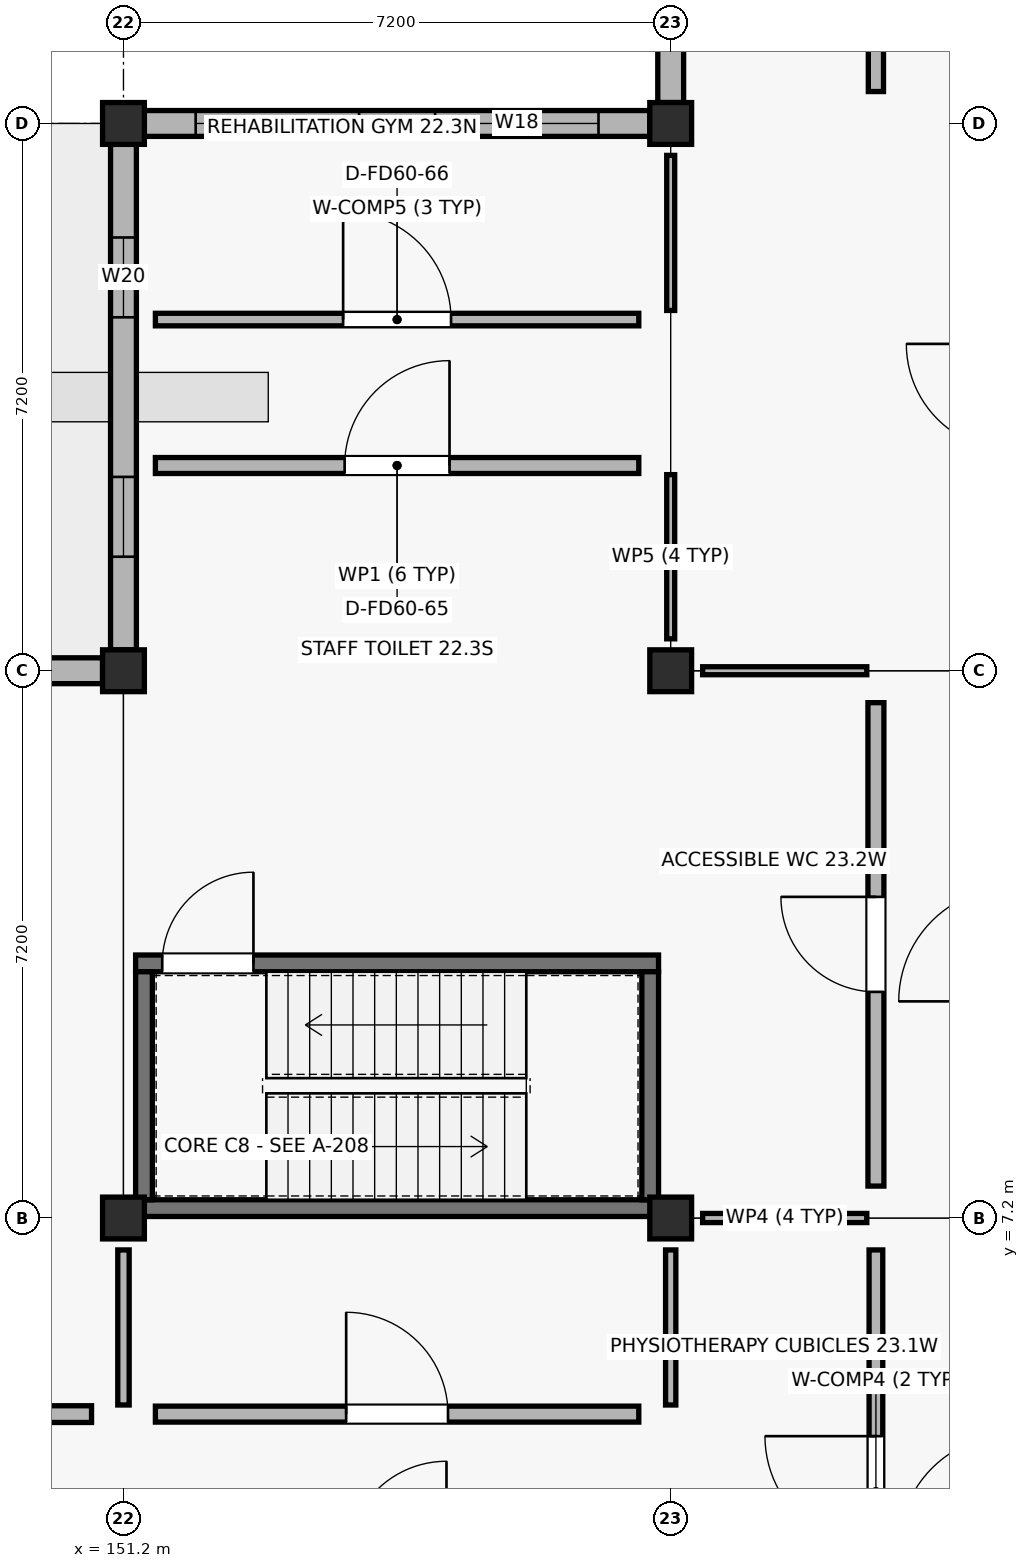
"""IFC4 building model, lengths in metres.
Left out: names, types, materials, properties, quantities, classifications, styles, units other than length and angle.
Written with IfcOpenShell. Run it as: python <this file> out.ifc"""

import sys

from ifc_helpers import new_model, si_unit, direction, frame, frame_2d, origin, origin_2d, place, context, subcontext, project, spatial, rectangle, extrude, element, fill, save


model = new_model("IFC4")
c1 = context("Model", 3, precision=1e-05, world=origin(), true_north=direction((0.0, 1.0)))
c2 = subcontext(c1, "Body", "Model", "MODEL_VIEW")
j1 = project(units=[si_unit("LENGTHUNIT", "METRE"), si_unit("PLANEANGLEUNIT", "RADIAN")], contexts=[c1])
p1 = place(None, origin())
s1 = spatial("IfcSite", under=j1, at=p1, CompositionType="ELEMENT")
p2 = place(p1, origin())
s2 = spatial("IfcBuilding", under=s1, at=p2, CompositionType="ELEMENT")
p3 = place(p2, origin())
s3 = spatial("IfcBuildingStorey", under=s2, at=p3, CompositionType="ELEMENT", Elevation=0.0)
for number, where, z_axis, x_axis in (
    (1, (151.2, 7.2, -0.25), (0.0, 0.0, 1.0), (1.0, 0.0, 0.0)),
    (2, (151.2, 14.4, -0.25), (0.0, 0.0, 1.0), (1.0, 0.0, 0.0)),
    (3, (151.2, 21.6, -0.25), (0.0, 0.0, 1.0), (1.0, 0.0, 0.0)),
    (4, (158.4, 7.2, -0.25), (0.0, 0.0, 1.0), (1.0, 0.0, 0.0)),
    (5, (158.4, 14.4, -0.25), (0.0, 0.0, 1.0), (1.0, 0.0, 0.0)),
    (6, (158.4, 21.6, -0.25), (0.0, 0.0, 1.0), (1.0, 0.0, 0.0)),
):
    element("IfcColumn", number, at=place(p3, frame(where, z_axis=z_axis, x_axis=x_axis)), inside=s3, PredefinedType="COLUMN", context=c2, shape_type="SweptSolid", body=[
        extrude(rectangle(XDim=0.55, YDim=0.55, at=origin_2d()), origin(), (0.0, 0.0, 1.0), 4.75),
    ])
p4 = place(p3, frame((150.925, 14.4, 0.0), z_axis=(0.0, 0.0, 1.0), x_axis=(-1.0, 0.0, 0.0)))
e7 = element("IfcWall", 7, at=p4, inside=s3, PredefinedType="SOLIDWALL", context=c2, shape_type="SweptSolid", body=[
    extrude(rectangle(XDim=6.65, YDim=0.34, at=frame_2d((3.325, 0.0))), origin(), (0.0, 0.0, 1.0), 3.47),
])
p5 = place(p4, frame((1.075, 0.0, 0.9)))
e8 = element("IfcOpeningElement", 8, at=p5, cuts=e7, PredefinedType="OPENING", context=c2, shape_type="SweptSolid", body=[
    extrude(rectangle(XDim=1.35, YDim=1.25, at=frame_2d((0.675, 0.625))), frame((0.0, 0.18, 0.0), z_axis=(0.0, -1.0, 0.0), x_axis=(1.0, 0.0, 0.0)), (0.0, 0.0, 1.0), 0.36),
])
p6 = place(p4, frame((4.225, 0.0, 0.9)))
e9 = element("IfcOpeningElement", 9, at=p6, cuts=e7, PredefinedType="OPENING", context=c2, shape_type="SweptSolid", body=[
    extrude(rectangle(XDim=1.35, YDim=1.25, at=frame_2d((0.675, 0.625))), frame((0.0, 0.18, 0.0), z_axis=(0.0, -1.0, 0.0), x_axis=(1.0, 0.0, 0.0)), (0.0, 0.0, 1.0), 0.36),
])
p7 = place(p3, frame((158.125, 21.6, 0.0), z_axis=(0.0, 0.0, 1.0), x_axis=(-1.0, 0.0, 0.0)))
e10 = element("IfcWall", 10, at=p7, inside=s3, PredefinedType="SOLIDWALL", context=c2, shape_type="SweptSolid", body=[
    extrude(rectangle(XDim=6.65, YDim=0.34, at=frame_2d((3.325, 0.0))), origin(), (0.0, 0.0, 1.0), 3.47),
])
p8 = place(p7, frame((0.675, 0.0, 0.9)))
e11 = element("IfcOpeningElement", 11, at=p8, cuts=e10, PredefinedType="OPENING", context=c2, shape_type="SweptSolid", body=[
    extrude(rectangle(XDim=2.15, YDim=1.38, at=frame_2d((1.075, 0.69))), frame((0.0, 0.18, 0.0), z_axis=(0.0, -1.0, 0.0), x_axis=(1.0, 0.0, 0.0)), (0.0, 0.0, 1.0), 0.36),
])
p9 = place(p7, frame((3.825, 0.0, 0.9)))
e12 = element("IfcOpeningElement", 12, at=p9, cuts=e10, PredefinedType="OPENING", context=c2, shape_type="SweptSolid", body=[
    extrude(rectangle(XDim=2.15, YDim=1.38, at=frame_2d((1.075, 0.69))), frame((0.0, 0.18, 0.0), z_axis=(0.0, -1.0, 0.0), x_axis=(1.0, 0.0, 0.0)), (0.0, 0.0, 1.0), 0.36),
])
p10 = place(p3, frame((151.2, 21.325, 0.0), z_axis=(0.0, 0.0, 1.0), x_axis=(0.0, -1.0, 0.0)))
e13 = element("IfcWall", 13, at=p10, inside=s3, PredefinedType="SOLIDWALL", context=c2, shape_type="SweptSolid", body=[
    extrude(rectangle(XDim=6.65, YDim=0.34, at=frame_2d((3.325, 0.0))), origin(), (0.0, 0.0, 1.0), 3.52),
])
p11 = place(p10, frame((1.225, 0.0, 0.9)))
e14 = element("IfcOpeningElement", 14, at=p11, cuts=e13, PredefinedType="OPENING", context=c2, shape_type="SweptSolid", body=[
    extrude(rectangle(XDim=1.05, YDim=1.5, at=frame_2d((0.525, 0.75))), frame((0.0, 0.18, 0.0), z_axis=(0.0, -1.0, 0.0), x_axis=(1.0, 0.0, 0.0)), (0.0, 0.0, 1.0), 0.36),
])
p12 = place(p10, frame((4.375, 0.0, 0.9)))
e15 = element("IfcOpeningElement", 15, at=p12, cuts=e13, PredefinedType="OPENING", context=c2, shape_type="SweptSolid", body=[
    extrude(rectangle(XDim=1.05, YDim=1.5, at=frame_2d((0.525, 0.75))), frame((0.0, 0.18, 0.0), z_axis=(0.0, -1.0, 0.0), x_axis=(1.0, 0.0, 0.0)), (0.0, 0.0, 1.0), 0.36),
])
p13 = place(p3, frame((158.4, 28.525, 0.0), z_axis=(0.0, 0.0, 1.0), x_axis=(0.0, -1.0, 0.0)))
e16 = element("IfcWall", 16, at=p13, inside=s3, PredefinedType="SOLIDWALL", context=c2, shape_type="SweptSolid", body=[
    extrude(rectangle(XDim=6.65, YDim=0.34, at=frame_2d((3.325, 0.0))), origin(), (0.0, 0.0, 1.0), 3.52),
])
p14 = place(p13, frame((0.925, 0.0, 0.9)))
e17 = element("IfcOpeningElement", 17, at=p14, cuts=e16, PredefinedType="OPENING", context=c2, shape_type="SweptSolid", body=[
    extrude(rectangle(XDim=1.65, YDim=1.75, at=frame_2d((0.825, 0.875))), frame((0.0, 0.18, 0.0), z_axis=(0.0, -1.0, 0.0), x_axis=(1.0, 0.0, 0.0)), (0.0, 0.0, 1.0), 0.36),
])
p15 = place(p13, frame((4.075, 0.0, 0.9)))
e18 = element("IfcOpeningElement", 18, at=p15, cuts=e16, PredefinedType="OPENING", context=c2, shape_type="SweptSolid", body=[
    extrude(rectangle(XDim=1.65, YDim=1.75, at=frame_2d((0.825, 0.875))), frame((0.0, 0.18, 0.0), z_axis=(0.0, -1.0, 0.0), x_axis=(1.0, 0.0, 0.0)), (0.0, 0.0, 1.0), 0.36),
])
p16 = place(p3, frame((151.36, 7.33, -0.25), z_axis=(0.0, 0.0, 1.0), x_axis=(1.0, 0.0, 0.0)))
e19 = element("IfcWall", 19, at=p16, inside=s3, PredefinedType="SHEAR", context=c2, shape_type="SweptSolid", body=[
    extrude(rectangle(XDim=6.88, YDim=0.22, at=frame_2d((3.44, 0.0))), origin(), (0.0, 0.0, 1.0), 4.47),
])
p17 = place(p3, frame((151.36, 10.55, -0.25), z_axis=(0.0, 0.0, 1.0), x_axis=(1.0, 0.0, 0.0)))
e20 = element("IfcWall", 20, at=p17, inside=s3, PredefinedType="SHEAR", context=c2, shape_type="SweptSolid", body=[
    extrude(rectangle(XDim=6.88, YDim=0.22, at=frame_2d((3.44, 0.0))), origin(), (0.0, 0.0, 1.0), 4.47),
])
p18 = place(p17, frame((0.35, 0.0, 0.25)))
e21 = element("IfcOpeningElement", 21, at=p18, cuts=e20, PredefinedType="OPENING", context=c2, shape_type="SweptSolid", body=[
    extrude(rectangle(XDim=1.2, YDim=2.15, at=frame_2d((0.6, 1.075))), frame((0.0, 0.12, 0.0), z_axis=(0.0, -1.0, 0.0), x_axis=(1.0, 0.0, 0.0)), (0.0, 0.0, 1.0), 0.24),
])
for number, where, z_axis, x_axis in (
    (22, (151.47, 7.44, -0.25), (0.0, 0.0, 1.0), (0.0, 1.0, 0.0)),
    (23, (158.13, 7.44, -0.25), (0.0, 0.0, 1.0), (0.0, 1.0, 0.0)),
):
    element("IfcWall", number, at=place(p3, frame(where, z_axis=z_axis, x_axis=x_axis)), inside=s3, PredefinedType="SHEAR", context=c2, shape_type="SweptSolid", body=[
        extrude(rectangle(XDim=3.0, YDim=0.22, at=frame_2d((1.5, 0.0))), origin(), (0.0, 0.0, 1.0), 4.47),
    ])
p19 = place(p3, frame((144.42, 4.62, 0.0), z_axis=(0.0, 0.0, 1.0), x_axis=(1.0, 0.0, 0.0)))
e24 = element("IfcWall", 24, at=p19, inside=s3, PredefinedType="SOLIDWALL", context=c2, shape_type="SweptSolid", body=[
    extrude(rectangle(XDim=6.36, YDim=0.22, at=frame_2d((3.18, 0.0))), origin(), (0.0, 0.0, 1.0), 3.36),
])
p20 = place(p19, frame((2.55, 0.0, 0.0)))
e25 = element("IfcOpeningElement", 25, at=p20, cuts=e24, PredefinedType="OPENING", context=c2, shape_type="SweptSolid", body=[
    extrude(rectangle(XDim=1.26, YDim=2.19, at=frame_2d((0.63, 1.095))), frame((0.0, 0.12, 0.0), z_axis=(0.0, -1.0, 0.0), x_axis=(1.0, 0.0, 0.0)), (0.0, 0.0, 1.0), 0.24),
])
p21 = place(p3, frame((151.2, 4.74, 0.0), z_axis=(0.0, 0.0, 1.0), x_axis=(0.0, 1.0, 0.0)))
e26 = element("IfcWall", 26, at=p21, inside=s3, PredefinedType="PARTITIONING", context=c2, shape_type="SweptSolid", body=[
    extrude(rectangle(XDim=2.04, YDim=0.15, at=frame_2d((1.02, 0.0))), origin(), (0.0, 0.0, 1.0), 3.36),
])
p22 = place(p3, frame((151.62, 4.62, 0.0), z_axis=(0.0, 0.0, 1.0), x_axis=(1.0, 0.0, 0.0)))
e27 = element("IfcWall", 27, at=p22, inside=s3, PredefinedType="PLUMBINGWALL", context=c2, shape_type="SweptSolid", body=[
    extrude(rectangle(XDim=6.36, YDim=0.21, at=frame_2d((3.18, 0.0))), origin(), (0.0, 0.0, 1.0), 3.36),
])
p23 = place(p22, frame((2.51, 0.0, 0.0)))
e28 = element("IfcOpeningElement", 28, at=p23, cuts=e27, PredefinedType="OPENING", context=c2, shape_type="SweptSolid", body=[
    extrude(rectangle(XDim=1.34, YDim=2.19, at=frame_2d((0.67, 1.095))), frame((0.0, 0.115, 0.0), z_axis=(0.0, -1.0, 0.0), x_axis=(1.0, 0.0, 0.0)), (0.0, 0.0, 1.0), 0.23),
])
p24 = place(p3, frame((158.4, 4.74, 0.0), z_axis=(0.0, 0.0, 1.0), x_axis=(0.0, 1.0, 0.0)))
e29 = element("IfcWall", 29, at=p24, inside=s3, PredefinedType="PARTITIONING", context=c2, shape_type="SweptSolid", body=[
    extrude(rectangle(XDim=2.04, YDim=0.135, at=frame_2d((1.02, 0.0))), origin(), (0.0, 0.0, 1.0), 3.36),
])
p25 = place(p3, frame((151.62, 17.1, 0.0), z_axis=(0.0, 0.0, 1.0), x_axis=(1.0, 0.0, 0.0)))
e30 = element("IfcWall", 30, at=p25, inside=s3, PredefinedType="PLUMBINGWALL", context=c2, shape_type="SweptSolid", body=[
    extrude(rectangle(XDim=6.36, YDim=0.21, at=frame_2d((3.18, 0.0))), origin(), (0.0, 0.0, 1.0), 3.36),
])
p26 = place(p25, frame((2.49, 0.0, 0.0)))
e31 = element("IfcOpeningElement", 31, at=p26, cuts=e30, PredefinedType="OPENING", context=c2, shape_type="SweptSolid", body=[
    extrude(rectangle(XDim=1.38, YDim=2.19, at=frame_2d((0.69, 1.095))), frame((0.0, 0.115, 0.0), z_axis=(0.0, -1.0, 0.0), x_axis=(1.0, 0.0, 0.0)), (0.0, 0.0, 1.0), 0.23),
])
p27 = place(p3, frame((158.4, 14.82, 0.0), z_axis=(0.0, 0.0, 1.0), x_axis=(0.0, 1.0, 0.0)))
e32 = element("IfcWall", 32, at=p27, inside=s3, PredefinedType="PARTITIONING", context=c2, shape_type="SweptSolid", body=[
    extrude(rectangle(XDim=2.16, YDim=0.105, at=frame_2d((1.08, 0.0))), origin(), (0.0, 0.0, 1.0), 3.36),
])
p28 = place(p3, frame((151.62, 19.02, 0.0), z_axis=(0.0, 0.0, 1.0), x_axis=(1.0, 0.0, 0.0)))
e33 = element("IfcWall", 33, at=p28, inside=s3, PredefinedType="PARTITIONING", context=c2, shape_type="SweptSolid", body=[
    extrude(rectangle(XDim=6.36, YDim=0.165, at=frame_2d((3.18, 0.0))), origin(), (0.0, 0.0, 1.0), 3.36),
])
p29 = place(p28, frame((2.47, 0.0, 0.0)))
e34 = element("IfcOpeningElement", 34, at=p29, cuts=e33, PredefinedType="OPENING", context=c2, shape_type="SweptSolid", body=[
    extrude(rectangle(XDim=1.42, YDim=2.19, at=frame_2d((0.71, 1.095))), frame((0.0, 0.093, 0.0), z_axis=(0.0, -1.0, 0.0), x_axis=(1.0, 0.0, 0.0)), (0.0, 0.0, 1.0), 0.185),
])
p30 = place(p3, frame((158.4, 19.14, 0.0), z_axis=(0.0, 0.0, 1.0), x_axis=(0.0, 1.0, 0.0)))
e35 = element("IfcWall", 35, at=p30, inside=s3, PredefinedType="PARTITIONING", context=c2, shape_type="SweptSolid", body=[
    extrude(rectangle(XDim=2.04, YDim=0.105, at=frame_2d((1.02, 0.0))), origin(), (0.0, 0.0, 1.0), 3.36),
])
p31 = place(p3, frame((161.1, 0.42, 0.0), z_axis=(0.0, 0.0, 1.0), x_axis=(0.0, 1.0, 0.0)))
e36 = element("IfcWall", 36, at=p31, inside=s3, PredefinedType="PARTITIONING", context=c2, shape_type="SweptSolid", body=[
    extrude(rectangle(XDim=6.36, YDim=0.18, at=frame_2d((3.18, 0.0))), origin(), (0.0, 0.0, 1.0), 3.36),
])
p32 = place(p31, frame((2.45, 0.0, 0.0)))
e37 = element("IfcOpeningElement", 37, at=p32, cuts=e36, PredefinedType="OPENING", context=c2, shape_type="SweptSolid", body=[
    extrude(rectangle(XDim=1.46, YDim=2.19, at=frame_2d((0.73, 1.095))), frame((0.0, 0.1, 0.0), z_axis=(0.0, -1.0, 0.0), x_axis=(1.0, 0.0, 0.0)), (0.0, 0.0, 1.0), 0.2),
])
p33 = place(p3, frame((158.82, 7.2, 0.0), z_axis=(0.0, 0.0, 1.0), x_axis=(1.0, 0.0, 0.0)))
e38 = element("IfcWall", 38, at=p33, inside=s3, PredefinedType="PARTITIONING", context=c2, shape_type="SweptSolid", body=[
    extrude(rectangle(XDim=2.16, YDim=0.12, at=frame_2d((1.08, 0.0))), origin(), (0.0, 0.0, 1.0), 3.36),
])
p34 = place(p3, frame((161.1, 7.62, 0.0), z_axis=(0.0, 0.0, 1.0), x_axis=(0.0, 1.0, 0.0)))
e39 = element("IfcWall", 39, at=p34, inside=s3, PredefinedType="PLUMBINGWALL", context=c2, shape_type="SweptSolid", body=[
    extrude(rectangle(XDim=6.36, YDim=0.21, at=frame_2d((3.18, 0.0))), origin(), (0.0, 0.0, 1.0), 3.36),
])
p35 = place(p34, frame((2.555, 0.0, 0.0)))
e40 = element("IfcOpeningElement", 40, at=p35, cuts=e39, PredefinedType="OPENING", context=c2, shape_type="SweptSolid", body=[
    extrude(rectangle(XDim=1.25, YDim=2.15, at=frame_2d((0.625, 1.075))), frame((0.0, 0.115, 0.0), z_axis=(0.0, -1.0, 0.0), x_axis=(1.0, 0.0, 0.0)), (0.0, 0.0, 1.0), 0.23),
])
p36 = place(p3, frame((158.82, 14.4, 0.0), z_axis=(0.0, 0.0, 1.0), x_axis=(1.0, 0.0, 0.0)))
e41 = element("IfcWall", 41, at=p36, inside=s3, PredefinedType="PARTITIONING", context=c2, shape_type="SweptSolid", body=[
    extrude(rectangle(XDim=2.16, YDim=0.105, at=frame_2d((1.08, 0.0))), origin(), (0.0, 0.0, 1.0), 3.36),
])
p37 = place(p3, frame((161.1, 22.02, 0.0), z_axis=(0.0, 0.0, 1.0), x_axis=(0.0, 1.0, 0.0)))
e42 = element("IfcWall", 42, at=p37, inside=s3, PredefinedType="SOLIDWALL", context=c2, shape_type="SweptSolid", body=[
    extrude(rectangle(XDim=6.36, YDim=0.2, at=frame_2d((3.18, 0.0))), origin(), (0.0, 0.0, 1.0), 3.36),
])
p38 = place(p37, frame((2.505, 0.0, 0.0)))
e43 = element("IfcOpeningElement", 43, at=p38, cuts=e42, PredefinedType="OPENING", context=c2, shape_type="SweptSolid", body=[
    extrude(rectangle(XDim=1.35, YDim=2.2, at=frame_2d((0.675, 1.1))), frame((0.0, 0.11, 0.0), z_axis=(0.0, -1.0, 0.0), x_axis=(1.0, 0.0, 0.0)), (0.0, 0.0, 1.0), 0.22),
])
p39 = place(p8, origin())
e44 = element("IfcWindow", 44, at=p39, inside=s3, PartitioningType="SINGLE_PANEL", PredefinedType="WINDOW", context=c2, shape_type="SweptSolid", body=[
    extrude(rectangle(XDim=2.15, YDim=1.38, at=frame_2d((1.075, 0.69))), frame((0.0, 0.03, 0.0), z_axis=(0.0, -1.0, 0.0), x_axis=(1.0, 0.0, 0.0)), (0.0, 0.0, 1.0), 0.06),
])
fill(e11, e44)
p40 = place(p9, origin())
e45 = element("IfcWindow", 45, at=p40, inside=s3, PartitioningType="SINGLE_PANEL", PredefinedType="WINDOW", context=c2, shape_type="SweptSolid", body=[
    extrude(rectangle(XDim=2.15, YDim=1.38, at=frame_2d((1.075, 0.69))), frame((0.0, 0.03, 0.0), z_axis=(0.0, -1.0, 0.0), x_axis=(1.0, 0.0, 0.0)), (0.0, 0.0, 1.0), 0.06),
])
fill(e12, e45)
p41 = place(p11, origin())
e46 = element("IfcWindow", 46, at=p41, inside=s3, PartitioningType="SINGLE_PANEL", PredefinedType="WINDOW", context=c2, shape_type="SweptSolid", body=[
    extrude(rectangle(XDim=1.05, YDim=1.5, at=frame_2d((0.525, 0.75))), frame((0.0, 0.03, 0.0), z_axis=(0.0, -1.0, 0.0), x_axis=(1.0, 0.0, 0.0)), (0.0, 0.0, 1.0), 0.06),
])
fill(e14, e46)
p42 = place(p12, origin())
e47 = element("IfcWindow", 47, at=p42, inside=s3, PartitioningType="SINGLE_PANEL", PredefinedType="WINDOW", context=c2, shape_type="SweptSolid", body=[
    extrude(rectangle(XDim=1.05, YDim=1.5, at=frame_2d((0.525, 0.75))), frame((0.0, 0.03, 0.0), z_axis=(0.0, -1.0, 0.0), x_axis=(1.0, 0.0, 0.0)), (0.0, 0.0, 1.0), 0.06),
])
fill(e15, e47)
p43 = place(p18, origin())
e48 = element("IfcDoor", 48, at=p43, inside=s3, OperationType="SINGLE_SWING_RIGHT", PredefinedType="DOOR", context=c2, shape_type="SweptSolid", body=[
    extrude(rectangle(XDim=1.2, YDim=2.15, at=frame_2d((0.6, 1.075))), frame((0.0, 0.025, 0.0), z_axis=(0.0, -1.0, 0.0), x_axis=(1.0, 0.0, 0.0)), (0.0, 0.0, 1.0), 0.05),
])
fill(e21, e48)
p44 = place(p23, origin())
e49 = element("IfcDoor", 49, at=p44, inside=s3, OperationType="SINGLE_SWING_LEFT", PredefinedType="DOOR", context=c2, shape_type="SweptSolid", body=[
    extrude(rectangle(XDim=1.34, YDim=2.19, at=frame_2d((0.67, 1.095))), frame((0.0, 0.025, 0.0), z_axis=(0.0, -1.0, 0.0), x_axis=(1.0, 0.0, 0.0)), (0.0, 0.0, 1.0), 0.05),
])
fill(e28, e49)
p45 = place(p26, origin())
e50 = element("IfcDoor", 50, at=p45, inside=s3, OperationType="SINGLE_SWING_RIGHT", PredefinedType="DOOR", context=c2, shape_type="SweptSolid", body=[
    extrude(rectangle(XDim=1.38, YDim=2.19, at=frame_2d((0.69, 1.095))), frame((0.0, 0.025, 0.0), z_axis=(0.0, -1.0, 0.0), x_axis=(1.0, 0.0, 0.0)), (0.0, 0.0, 1.0), 0.05),
])
fill(e31, e50)
p46 = place(p29, origin())
e51 = element("IfcDoor", 51, at=p46, inside=s3, OperationType="SINGLE_SWING_LEFT", PredefinedType="DOOR", context=c2, shape_type="SweptSolid", body=[
    extrude(rectangle(XDim=1.42, YDim=2.19, at=frame_2d((0.71, 1.095))), frame((0.0, 0.025, 0.0), z_axis=(0.0, -1.0, 0.0), x_axis=(1.0, 0.0, 0.0)), (0.0, 0.0, 1.0), 0.05),
])
fill(e34, e51)
p47 = place(p32, origin())
e52 = element("IfcDoor", 52, at=p47, inside=s3, OperationType="SINGLE_SWING_RIGHT", PredefinedType="DOOR", context=c2, shape_type="SweptSolid", body=[
    extrude(rectangle(XDim=1.46, YDim=2.19, at=frame_2d((0.73, 1.095))), frame((0.0, 0.025, 0.0), z_axis=(0.0, -1.0, 0.0), x_axis=(1.0, 0.0, 0.0)), (0.0, 0.0, 1.0), 0.05),
])
fill(e37, e52)
p48 = place(p35, origin())
e53 = element("IfcDoor", 53, at=p48, inside=s3, OperationType="SINGLE_SWING_RIGHT", PredefinedType="DOOR", context=c2, shape_type="SweptSolid", body=[
    extrude(rectangle(XDim=1.25, YDim=2.15, at=frame_2d((0.625, 1.075))), frame((0.0, 0.025, 0.0), z_axis=(0.0, -1.0, 0.0), x_axis=(1.0, 0.0, 0.0)), (0.0, 0.0, 1.0), 0.05),
])
fill(e40, e53)
save(model, sys.argv[1])
